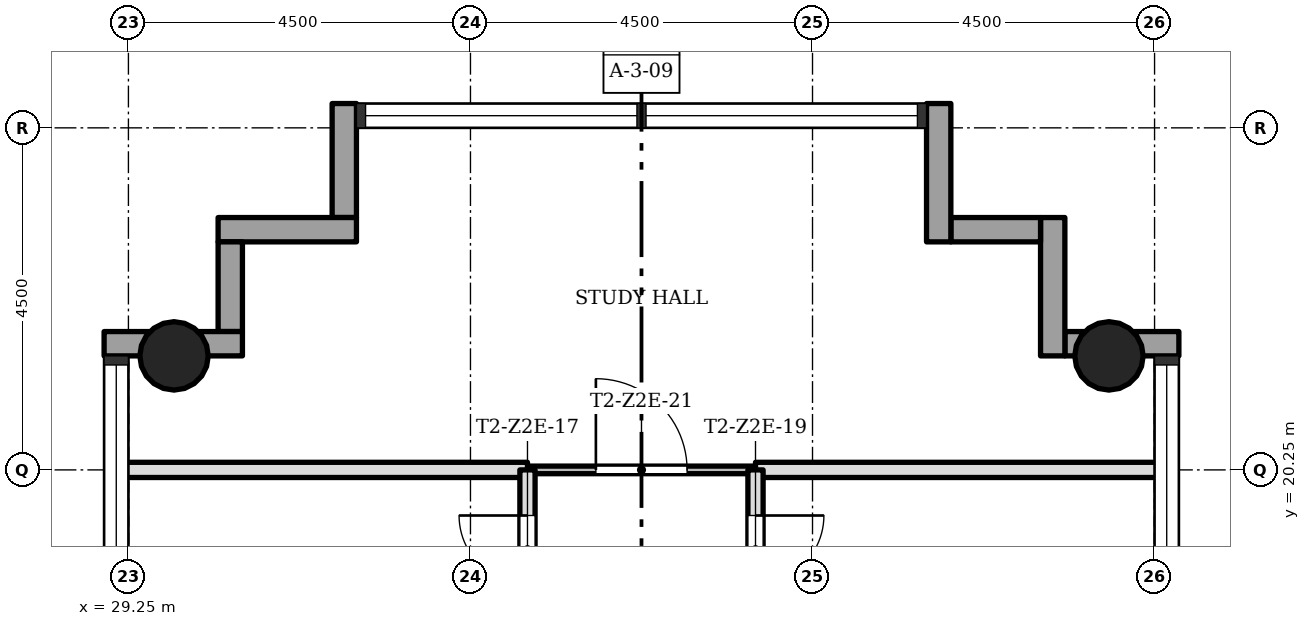
"""IFC4 building model, lengths in metres.
Left out: names, types, materials, properties, quantities, classifications, styles, units other than length and angle.
Written with IfcOpenShell. Run it as: python <this file> out.ifc"""

import sys

from ifc_helpers import new_model, si_unit, direction, frame, frame_2d, origin, origin_2d, place, context, subcontext, project, spatial, rectangle, hollow_circle, extrude, element, fill, save


model = new_model("IFC4")
c1 = context("Model", 3, precision=1e-05, world=origin(), true_north=direction((0.0, 1.0)))
c2 = subcontext(c1, "Body", "Model", "MODEL_VIEW")
j1 = project(units=[si_unit("LENGTHUNIT", "METRE"), si_unit("PLANEANGLEUNIT", "RADIAN")], contexts=[c1])
p1 = place(None, origin())
s1 = spatial("IfcSite", under=j1, at=p1, CompositionType="ELEMENT")
p2 = place(p1, origin())
s2 = spatial("IfcBuilding", under=s1, at=p2, CompositionType="ELEMENT")
p3 = place(p2, frame((0.0, 0.0, 97.0)))
s3 = spatial("IfcBuildingStorey", under=s2, at=p3, CompositionType="ELEMENT", Elevation=97.0)
for number, where, z_axis, x_axis in (
    (1, (42.15, 21.75, 0.0), (0.0, 0.0, 1.0), (1.0, 0.0, 0.0)),
    (2, (29.85, 21.75, 0.0), (0.0, 0.0, 1.0), (1.0, 0.0, 0.0)),
):
    element("IfcColumn", number, at=place(p3, frame(where, z_axis=z_axis, x_axis=x_axis)), inside=s3, PredefinedType="COLUMN", context=c2, shape_type="SweptSolid", body=[
        extrude(hollow_circle(Radius=0.45, WallThickness=0.032, at=origin_2d()), origin(), (0.0, 0.0, 1.0), 3.4),
    ])
p4 = place(p3, frame((43.07, 21.91, -0.3), z_axis=(0.0, 0.0, 1.0), x_axis=(-1.0, 0.0, 0.0)))
e3 = element("IfcWall", 3, at=p4, inside=s3, PredefinedType="STANDARD", context=c2, shape_type="SweptSolid", body=[
    extrude(rectangle(XDim=1.5, YDim=0.32, at=frame_2d((0.75, 0.0))), origin(), (0.0, 0.0, 1.0), 3.4),
])
p5 = place(p3, frame((41.41, 21.75, -0.3), z_axis=(0.0, 0.0, 1.0), x_axis=(0.0, 1.0, 0.0)))
e4 = element("IfcWall", 4, at=p5, inside=s3, PredefinedType="STANDARD", context=c2, shape_type="SweptSolid", body=[
    extrude(rectangle(XDim=1.82, YDim=0.32, at=frame_2d((0.91, 0.0))), origin(), (0.0, 0.0, 1.0), 3.4),
])
p6 = place(p3, frame((41.25, 23.41, -0.3), z_axis=(0.0, 0.0, 1.0), x_axis=(-1.0, 0.0, 0.0)))
e5 = element("IfcWall", 5, at=p6, inside=s3, PredefinedType="STANDARD", context=c2, shape_type="SweptSolid", body=[
    extrude(rectangle(XDim=1.18, YDim=0.32, at=frame_2d((0.59, 0.0))), origin(), (0.0, 0.0, 1.0), 3.4),
])
p7 = place(p3, frame((39.91, 23.25, -0.3), z_axis=(0.0, 0.0, 1.0), x_axis=(0.0, 1.0, 0.0)))
e6 = element("IfcWall", 6, at=p7, inside=s3, PredefinedType="STANDARD", context=c2, shape_type="SweptSolid", body=[
    extrude(rectangle(XDim=1.82, YDim=0.32, at=frame_2d((0.91, 0.0))), origin(), (0.0, 0.0, 1.0), 3.4),
])
p8 = place(p3, frame((32.09, 25.07, -0.3), z_axis=(0.0, 0.0, 1.0), x_axis=(0.0, -1.0, 0.0)))
e7 = element("IfcWall", 7, at=p8, inside=s3, PredefinedType="STANDARD", context=c2, shape_type="SweptSolid", body=[
    extrude(rectangle(XDim=1.5, YDim=0.32, at=frame_2d((0.75, 0.0))), origin(), (0.0, 0.0, 1.0), 3.4),
])
p9 = place(p3, frame((32.25, 23.41, -0.3), z_axis=(0.0, 0.0, 1.0), x_axis=(-1.0, 0.0, 0.0)))
e8 = element("IfcWall", 8, at=p9, inside=s3, PredefinedType="STANDARD", context=c2, shape_type="SweptSolid", body=[
    extrude(rectangle(XDim=1.82, YDim=0.32, at=frame_2d((0.91, 0.0))), origin(), (0.0, 0.0, 1.0), 3.4),
])
p10 = place(p3, frame((30.59, 23.25, -0.3), z_axis=(0.0, 0.0, 1.0), x_axis=(0.0, -1.0, 0.0)))
e9 = element("IfcWall", 9, at=p10, inside=s3, PredefinedType="STANDARD", context=c2, shape_type="SweptSolid", body=[
    extrude(rectangle(XDim=1.18, YDim=0.32, at=frame_2d((0.59, 0.0))), origin(), (0.0, 0.0, 1.0), 3.4),
])
p11 = place(p3, frame((30.75, 21.91, -0.3), z_axis=(0.0, 0.0, 1.0), x_axis=(-1.0, 0.0, 0.0)))
e10 = element("IfcWall", 10, at=p11, inside=s3, PredefinedType="STANDARD", context=c2, shape_type="SweptSolid", body=[
    extrude(rectangle(XDim=1.82, YDim=0.32, at=frame_2d((0.91, 0.0))), origin(), (0.0, 0.0, 1.0), 3.4),
])
p12 = place(p3, frame((37.5, 20.25, 0.0), z_axis=(0.0, 0.0, 1.0), x_axis=(-1.0, 0.0, 0.0)))
e11 = element("IfcWall", 11, at=p12, inside=s3, PredefinedType="PARTITIONING", context=c2, shape_type="SweptSolid", body=[
    extrude(rectangle(XDim=3.0, YDim=0.1, at=frame_2d((1.5, 0.0))), origin(), (0.0, 0.0, 1.0), 3.0),
])
p13 = place(p12, frame((0.9, 0.0, 0.0)))
e12 = element("IfcOpeningElement", 12, at=p13, cuts=e11, PredefinedType="OPENING", context=c2, shape_type="SweptSolid", body=[
    extrude(rectangle(XDim=1.2, YDim=2.1, at=frame_2d((0.6, 1.05))), frame((0.0, 0.06, 0.0), z_axis=(0.0, -1.0, 0.0), x_axis=(1.0, 0.0, 0.0)), (0.0, 0.0, 1.0), 0.12),
])
for number, where, z_axis, x_axis in (
    (13, (42.85, 20.25, 0.0), (0.0, 0.0, 1.0), (-1.0, 0.0, 0.0)),
    (14, (34.5, 20.25, 0.0), (0.0, 0.0, 1.0), (-1.0, 0.0, 0.0)),
):
    element("IfcWall", number, at=place(p3, frame(where, z_axis=z_axis, x_axis=x_axis)), inside=s3, PredefinedType="SOLIDWALL", context=c2, shape_type="SweptSolid", body=[
        extrude(rectangle(XDim=5.35, YDim=0.2, at=frame_2d((2.675, 0.0))), origin(), (0.0, 0.0, 1.0), 3.0),
    ])
p14 = place(p3, frame((37.5, 15.75, 0.0), z_axis=(0.0, 0.0, 1.0), x_axis=(0.0, 1.0, 0.0)))
e15 = element("IfcWall", 15, at=p14, inside=s3, PredefinedType="SOLIDWALL", context=c2, shape_type="SweptSolid", body=[
    extrude(rectangle(XDim=4.5, YDim=0.2, at=frame_2d((2.25, 0.0))), origin(), (0.0, 0.0, 1.0), 3.0),
])
p15 = place(p14, frame((3.0, 0.0, 0.0)))
e16 = element("IfcOpeningElement", 16, at=p15, cuts=e15, PredefinedType="OPENING", context=c2, shape_type="SweptSolid", body=[
    extrude(rectangle(XDim=0.9, YDim=2.1, at=frame_2d((0.45, 1.05))), frame((0.0, 0.11, 0.0), z_axis=(0.0, -1.0, 0.0), x_axis=(1.0, 0.0, 0.0)), (0.0, 0.0, 1.0), 0.22),
])
p16 = place(p3, frame((34.5, 15.75, 0.0), z_axis=(0.0, 0.0, 1.0), x_axis=(0.0, 1.0, 0.0)))
e17 = element("IfcWall", 17, at=p16, inside=s3, PredefinedType="SOLIDWALL", context=c2, shape_type="SweptSolid", body=[
    extrude(rectangle(XDim=4.5, YDim=0.2, at=frame_2d((2.25, 0.0))), origin(), (0.0, 0.0, 1.0), 3.0),
])
p17 = place(p16, frame((3.0, 0.0, 0.0)))
e18 = element("IfcOpeningElement", 18, at=p17, cuts=e17, PredefinedType="OPENING", context=c2, shape_type="SweptSolid", body=[
    extrude(rectangle(XDim=0.9, YDim=2.1, at=frame_2d((0.45, 1.05))), frame((0.0, 0.11, 0.0), z_axis=(0.0, -1.0, 0.0), x_axis=(1.0, 0.0, 0.0)), (0.0, 0.0, 1.0), 0.22),
])
p18 = place(p17, origin())
e19 = element("IfcDoor", 19, at=p18, inside=s3, OperationType="SINGLE_SWING_LEFT", PredefinedType="DOOR", context=c2, shape_type="SweptSolid", body=[
    extrude(rectangle(XDim=0.9, YDim=2.1, at=frame_2d((0.45, 1.05))), frame((0.0, 0.025, 0.0), z_axis=(0.0, -1.0, 0.0), x_axis=(1.0, 0.0, 0.0)), (0.0, 0.0, 1.0), 0.05),
])
fill(e18, e19)
p19 = place(p15, origin())
e20 = element("IfcDoor", 20, at=p19, inside=s3, OperationType="SINGLE_SWING_RIGHT", PredefinedType="DOOR", context=c2, shape_type="SweptSolid", body=[
    extrude(rectangle(XDim=0.9, YDim=2.1, at=frame_2d((0.45, 1.05))), frame((0.0, 0.025, 0.0), z_axis=(0.0, -1.0, 0.0), x_axis=(1.0, 0.0, 0.0)), (0.0, 0.0, 1.0), 0.05),
])
fill(e16, e20)
p20 = place(p13, origin())
e21 = element("IfcDoor", 21, at=p20, inside=s3, OperationType="SINGLE_SWING_RIGHT", PredefinedType="DOOR", context=c2, shape_type="SweptSolid", body=[
    extrude(rectangle(XDim=1.2, YDim=2.1, at=frame_2d((0.6, 1.05))), frame((0.0, 0.025, 0.0), z_axis=(0.0, -1.0, 0.0), x_axis=(1.0, 0.0, 0.0)), (0.0, 0.0, 1.0), 0.05),
])
fill(e12, e21)
save(model, sys.argv[1])
